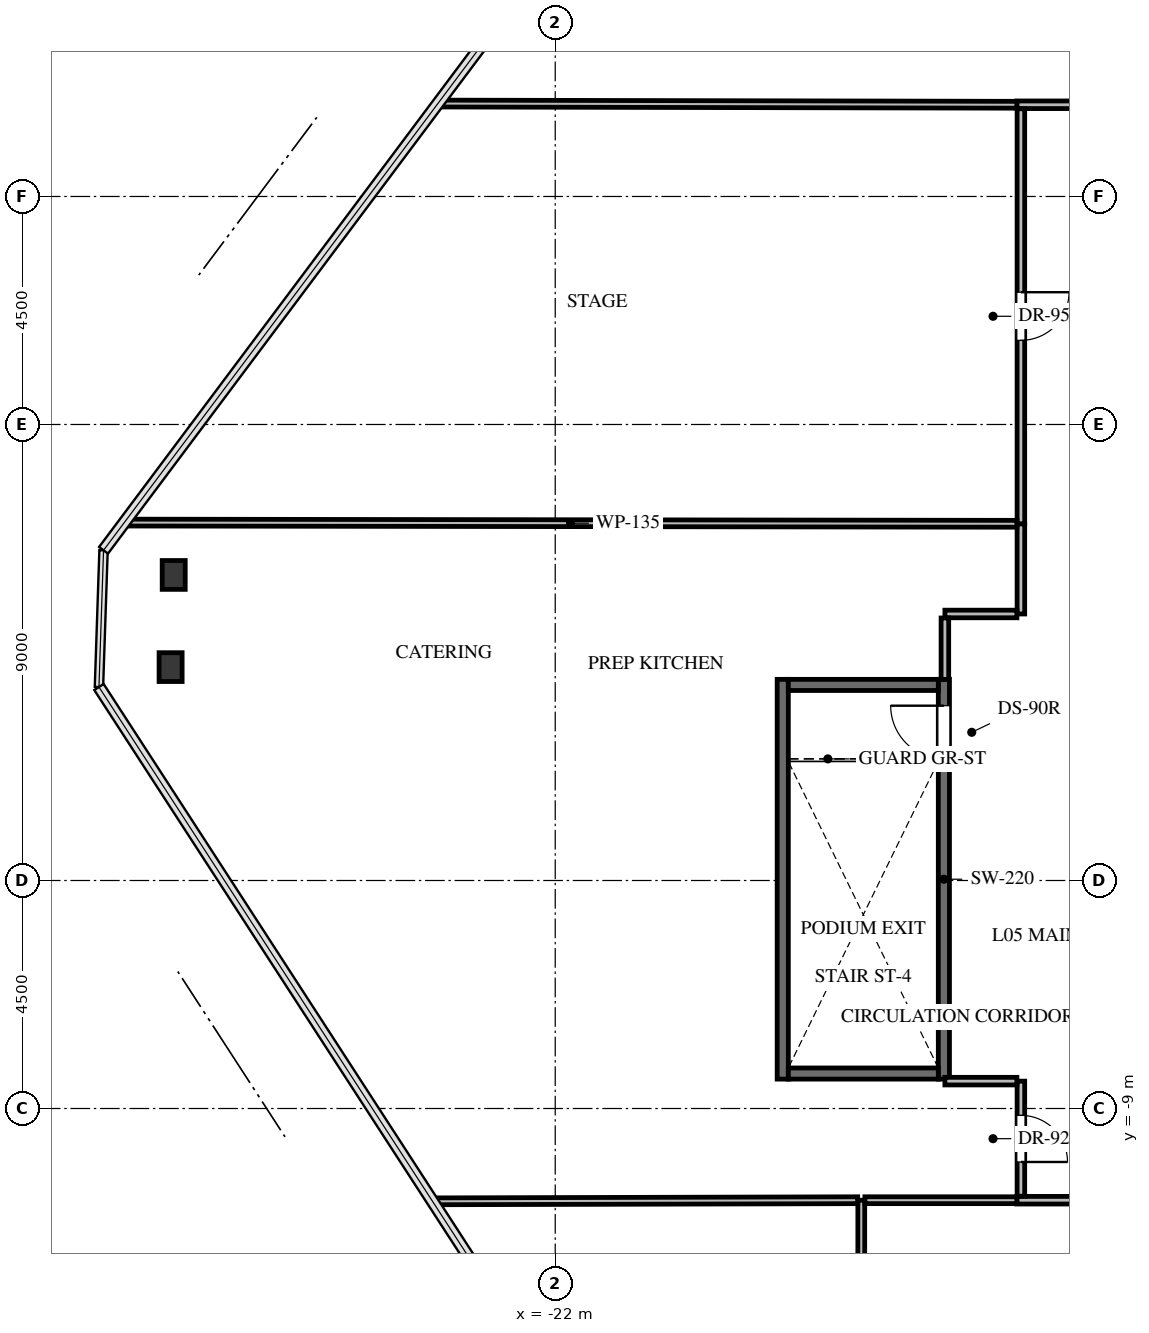
"""IFC4 building model, lengths in metres.
Left out: names, types, materials, properties, quantities, classifications, styles, units other than length and angle.
Written with IfcOpenShell. Run it as: python <this file> out.ifc"""

import sys

from ifc_helpers import new_model, si_unit, direction, frame, frame_2d, origin, origin_2d, place, context, subcontext, project, spatial, rectangle, i_section, extrude, source, transform, mapped, element, fill, save


model = new_model("IFC4")
c1 = context("Model", 3, precision=1e-05, world=origin(), true_north=direction((0.0, 1.0)))
c2 = subcontext(c1, "Body", "Model", "MODEL_VIEW")
j1 = project(units=[si_unit("LENGTHUNIT", "METRE"), si_unit("PLANEANGLEUNIT", "RADIAN")], contexts=[c1])
p1 = place(None, origin())
s1 = spatial("IfcSite", under=j1, at=p1, CompositionType="ELEMENT")
p2 = place(p1, origin())
s2 = spatial("IfcBuilding", under=s1, at=p2, CompositionType="ELEMENT")
p3 = place(p2, frame((0.0, 0.0, 26.8)))
s3 = spatial("IfcBuildingStorey", under=s2, at=p3, CompositionType="ELEMENT", Elevation=26.8)
p4 = place(p3, frame((-14.33, -8.42, -0.32), z_axis=(0.0, 0.0, 1.0), x_axis=(0.0, 1.0, 0.0)))
e1 = element("IfcWall", 1, at=p4, inside=s3, PredefinedType="SHEAR", context=c2, shape_type="SweptSolid", body=[
    extrude(rectangle(XDim=7.89, YDim=0.22, at=frame_2d((3.945, 0.0))), origin(), (0.0, 0.0, 1.0), 5.68),
])
p5 = place(p4, frame((6.32, 0.0, 0.0)))
e2 = element("IfcOpeningElement", 2, at=p5, cuts=e1, PredefinedType="OPENING", context=c2, shape_type="SweptSolid", body=[
    extrude(rectangle(XDim=1.05, YDim=2.15, at=frame_2d((0.525, 1.075))), frame((0.0, 0.12, 0.0), z_axis=(0.0, -1.0, 0.0), x_axis=(1.0, 0.0, 0.0)), (0.0, 0.0, 1.0), 0.24),
])
p6 = place(p3, frame((-17.51, -0.53, -0.32), z_axis=(0.0, 0.0, 1.0), x_axis=(0.0, -1.0, 0.0)))
e3 = element("IfcWall", 3, at=p6, inside=s3, PredefinedType="SHEAR", context=c2, shape_type="SweptSolid", body=[
    extrude(rectangle(XDim=7.89, YDim=0.22, at=frame_2d((3.945, 0.0))), origin(), (0.0, 0.0, 1.0), 5.68),
])
for number, where, z_axis, x_axis in (
    (4, (-17.4, -8.31, -0.32), (0.0, 0.0, 1.0), (1.0, 0.0, 0.0)),
    (5, (-14.44, -0.64, -0.32), (0.0, 0.0, 1.0), (-1.0, 0.0, 0.0)),
):
    element("IfcWall", number, at=place(p3, frame(where, z_axis=z_axis, x_axis=x_axis)), inside=s3, PredefinedType="SHEAR", context=c2, shape_type="SweptSolid", body=[
        extrude(rectangle(XDim=2.96, YDim=0.22, at=frame_2d((1.48, 0.0))), origin(), (0.0, 0.0, 1.0), 5.68),
    ])
m1 = source(origin(), c2, "Body", "SweptSolid", [
    extrude(i_section(OverallWidth=0.454, OverallDepth=0.569, WebThickness=0.078, FlangeThickness=0.125, FilletRadius=0.031, at=origin_2d()), origin(), (0.0, 0.0, 1.0), 5.68),
])
for number, where, z_axis, x_axis in (
    (6, (-29.591, -0.289, -0.32), (0.0, 0.0, 1.0), (1.0, 0.0, 0.0)),
    (7, (-29.529, 1.531, -0.32), (0.0, 0.0, 1.0), (1.0, 0.0, 0.0)),
):
    element("IfcColumn", number, at=place(p3, frame(where, z_axis=z_axis, x_axis=x_axis)), inside=s3, PredefinedType="COLUMN", context=c2, shape_type="MappedRepresentation", body=[
        mapped(m1, transform((0.0, 0.0, 0.0), x_axis=(1.0, 0.0, 0.0), y_axis=(0.0, 1.0, 0.0), z_axis=(0.0, 0.0, 1.0), scale=1.0)),
    ])
p7 = place(p3, frame((-8.96, 10.81, 0.0), z_axis=(0.0, 0.0, 1.0), x_axis=(-1.0, 0.0, 0.0)))
e8 = element("IfcWall", 8, at=p7, inside=s3, PredefinedType="PARTITIONING", context=c2, shape_type="SweptSolid", body=[
    extrude(rectangle(XDim=3.93, YDim=0.15, at=frame_2d((1.965, 0.0))), origin(), (0.0, 0.0, 1.0), 3.53),
])
p8 = place(p7, frame((1.49, 0.0, 0.0)))
e9 = element("IfcOpeningElement", 9, at=p8, cuts=e8, PredefinedType="OPENING", context=c2, shape_type="SweptSolid", body=[
    extrude(rectangle(XDim=0.95, YDim=2.1, at=frame_2d((0.475, 1.05))), frame((0.0, 0.085, 0.0), z_axis=(0.0, -1.0, 0.0), x_axis=(1.0, 0.0, 0.0)), (0.0, 0.0, 1.0), 0.17),
])
p9 = place(p3, frame((-12.89, -10.81, 0.0), z_axis=(0.0, 0.0, 1.0), x_axis=(1.0, 0.0, 0.0)))
e10 = element("IfcWall", 10, at=p9, inside=s3, PredefinedType="PARTITIONING", context=c2, shape_type="SweptSolid", body=[
    extrude(rectangle(XDim=6.93, YDim=0.15, at=frame_2d((3.465, 0.0))), origin(), (0.0, 0.0, 1.0), 3.53),
])
p10 = place(p9, frame((3.005, 0.0, 0.0)))
e11 = element("IfcOpeningElement", 11, at=p10, cuts=e10, PredefinedType="OPENING", context=c2, shape_type="SweptSolid", body=[
    extrude(rectangle(XDim=0.92, YDim=2.1, at=frame_2d((0.46, 1.05))), frame((0.0, 0.085, 0.0), z_axis=(0.0, -1.0, 0.0), x_axis=(1.0, 0.0, 0.0)), (0.0, 0.0, 1.0), 0.17),
])
p11 = place(p3, frame((-12.81, -8.46, 0.0), z_axis=(0.0, 0.0, 1.0), x_axis=(0.0, -1.0, 0.0)))
e12 = element("IfcWall", 12, at=p11, inside=s3, PredefinedType="PARTITIONING", context=c2, shape_type="SweptSolid", body=[
    extrude(rectangle(XDim=2.271, YDim=0.15, at=frame_2d((1.135, 0.0))), origin(), (0.0, 0.0, 1.0), 5.345),
])
p12 = place(p11, frame((0.676, 0.0, 0.0)))
e13 = element("IfcOpeningElement", 13, at=p12, cuts=e12, PredefinedType="OPENING", context=c2, shape_type="SweptSolid", body=[
    extrude(rectangle(XDim=0.92, YDim=2.1, at=frame_2d((0.46, 1.05))), frame((0.0, 0.085, 0.0), z_axis=(0.0, -1.0, 0.0), x_axis=(1.0, 0.0, 0.0)), (0.0, 0.0, 1.0), 0.17),
])
p13 = place(p3, frame((-12.81, 2.54, 0.0), z_axis=(0.0, 0.0, 1.0), x_axis=(0.0, -1.0, 0.0)))
e14 = element("IfcWall", 14, at=p13, inside=s3, PredefinedType="PARTITIONING", context=c2, shape_type="SweptSolid", body=[
    extrude(rectangle(XDim=1.78, YDim=0.15, at=frame_2d((0.89, 0.0))), origin(), (0.0, 0.0, 1.0), 3.53),
])
for number, where, z_axis, x_axis in (
    (15, (-12.889, 0.76, 0.0), (0.0, 0.0, 1.0), (-1.0, 0.0, 0.0)),
    (16, (-14.31, -8.46, 0.0), (0.0, 0.0, 1.0), (1.0, 0.0, 0.0)),
):
    element("IfcWall", number, at=place(p3, frame(where, z_axis=z_axis, x_axis=x_axis)), inside=s3, PredefinedType="PARTITIONING", context=c2, shape_type="SweptSolid", body=[
        extrude(rectangle(XDim=1.421, YDim=0.15, at=frame_2d((0.71, 0.0))), origin(), (0.0, 0.0, 1.0), 5.345),
    ])
p14 = place(p3, frame((-14.31, 0.681, 0.0), z_axis=(0.0, 0.0, 1.0), x_axis=(0.0, -1.0, 0.0)))
e17 = element("IfcWall", 17, at=p14, inside=s3, PredefinedType="PARTITIONING", context=c2, shape_type="SweptSolid", body=[
    extrude(rectangle(XDim=1.211, YDim=0.15, at=frame_2d((0.605, 0.0))), origin(), (0.0, 0.0, 1.0), 5.345),
])
p15 = place(p3, frame((-12.81, 10.731, 0.0), z_axis=(0.0, 0.0, 1.0), x_axis=(0.0, -1.0, 0.0)))
e18 = element("IfcWall", 18, at=p15, inside=s3, PredefinedType="PARTITIONING", context=c2, shape_type="SweptSolid", body=[
    extrude(rectangle(XDim=8.191, YDim=0.15, at=frame_2d((4.095, 0.0))), origin(), (0.0, 0.0, 1.0), 3.53),
])
p16 = place(p15, frame((3.621, 0.0, 0.0)))
e19 = element("IfcOpeningElement", 19, at=p16, cuts=e18, PredefinedType="OPENING", context=c2, shape_type="SweptSolid", body=[
    extrude(rectangle(XDim=0.95, YDim=2.1, at=frame_2d((0.475, 1.05))), frame((0.0, 0.085, 0.0), z_axis=(0.0, -1.0, 0.0), x_axis=(1.0, 0.0, 0.0)), (0.0, 0.0, 1.0), 0.17),
])
p17 = place(p3, frame((-12.89, 10.81, 0.0), z_axis=(0.0, 0.0, 1.0), x_axis=(-0.999997852069, 0.002072645121, 0.0)))
e20 = element("IfcWall", 20, at=p17, inside=s3, PredefinedType="PARTITIONING", context=c2, shape_type="SweptSolid", body=[
    extrude(rectangle(XDim=11.426, YDim=0.135, at=frame_2d((5.713, 0.0))), origin(), (0.0, 0.0, 1.0), 3.53),
])
p18 = place(p3, frame((-15.96, -10.81, 0.0), z_axis=(0.0, 0.0, 1.0), x_axis=(0.0, -1.0, 0.0)))
e21 = element("IfcWall", 21, at=p18, inside=s3, PredefinedType="PARTITIONING", context=c2, shape_type="SweptSolid", body=[
    extrude(rectangle(XDim=6.015, YDim=0.135, at=frame_2d((3.007, 0.0))), origin(), (0.0, 0.0, 1.0), 5.345),
])
p19 = place(p18, frame((2.558, 0.0, 0.0)))
e22 = element("IfcOpeningElement", 22, at=p19, cuts=e21, PredefinedType="OPENING", context=c2, shape_type="SweptSolid", body=[
    extrude(rectangle(XDim=0.9, YDim=2.05, at=frame_2d((0.45, 1.025))), frame((0.0, 0.078, 0.0), z_axis=(0.0, -1.0, 0.0), x_axis=(1.0, 0.0, 0.0)), (0.0, 0.0, 1.0), 0.155),
])
p20 = place(p3, frame((-24.422, -10.832, 0.0), z_axis=(0.0, 0.0, 1.0), x_axis=(0.9999967215, 0.002560662035, 0.0)))
e23 = element("IfcWall", 23, at=p20, inside=s3, PredefinedType="PARTITIONING", context=c2, shape_type="SweptSolid", body=[
    extrude(rectangle(XDim=8.39, YDim=0.135, at=frame_2d((4.195, 0.0))), origin(), (0.0, 0.0, 1.0), 3.53),
])
p21 = place(p3, frame((-15.888, -10.81, 0.0), z_axis=(0.0, 0.0, 1.0), x_axis=(1.0, 0.0, 0.0)))
e24 = element("IfcWall", 24, at=p21, inside=s3, PredefinedType="PARTITIONING", context=c2, shape_type="SweptSolid", body=[
    extrude(rectangle(XDim=2.999, YDim=0.135, at=frame_2d((1.499, 0.0))), origin(), (0.0, 0.0, 1.0), 5.345),
])
p22 = place(p3, frame((-30.505, 2.564, 0.0), z_axis=(0.0, 0.0, 1.0), x_axis=(0.999999077639, -0.001358204807, 0.0)))
e25 = element("IfcWall", 25, at=p22, inside=s3, PredefinedType="PARTITIONING", context=c2, shape_type="SweptSolid", body=[
    extrude(rectangle(XDim=17.616, YDim=0.135, at=frame_2d((8.808, 0.0))), origin(), (0.0, 0.0, 1.0), 3.53),
])
m2 = source(origin(), c2, "Body", "SweptSolid", [
    extrude(rectangle(XDim=1.05, YDim=2.15, at=frame_2d((0.525, 1.075))), frame((0.0, 0.025, 0.0), z_axis=(0.0, -1.0, 0.0), x_axis=(1.0, 0.0, 0.0)), (0.0, 0.0, 1.0), 0.05),
])
p23 = place(p5, origin())
e26 = element("IfcDoor", 26, at=p23, inside=s3, OperationType="SINGLE_SWING_RIGHT", PredefinedType="DOOR", context=c2, shape_type="MappedRepresentation", body=[
    mapped(m2, transform((0.0, 0.0, 0.0), x_axis=(1.0, 0.0, 0.0), y_axis=(0.0, 1.0, 0.0), z_axis=(0.0, 0.0, 1.0), scale=1.0)),
])
fill(e2, e26)
m3 = source(origin(), c2, "Body", "SweptSolid", [
    extrude(rectangle(XDim=0.92, YDim=2.1, at=frame_2d((0.46, 1.05))), frame((0.0, 0.025, 0.0), z_axis=(0.0, -1.0, 0.0), x_axis=(1.0, 0.0, 0.0)), (0.0, 0.0, 1.0), 0.05),
])
p24 = place(p12, origin())
e27 = element("IfcDoor", 27, at=p24, inside=s3, OperationType="SINGLE_SWING_RIGHT", PredefinedType="DOOR", context=c2, shape_type="MappedRepresentation", body=[
    mapped(m3, transform((0.0, 0.0, 0.0), x_axis=(1.0, 0.0, 0.0), y_axis=(0.0, 1.0, 0.0), z_axis=(0.0, 0.0, 1.0), scale=1.0)),
])
fill(e13, e27)
m4 = source(origin(), c2, "Body", "SweptSolid", [
    extrude(rectangle(XDim=0.95, YDim=2.1, at=frame_2d((0.475, 1.05))), frame((0.0, 0.025, 0.0), z_axis=(0.0, -1.0, 0.0), x_axis=(1.0, 0.0, 0.0)), (0.0, 0.0, 1.0), 0.05),
])
p25 = place(p16, origin())
e28 = element("IfcDoor", 28, at=p25, inside=s3, OperationType="SINGLE_SWING_LEFT", PredefinedType="DOOR", context=c2, shape_type="MappedRepresentation", body=[
    mapped(m4, transform((0.0, 0.0, 0.0), x_axis=(1.0, 0.0, 0.0), y_axis=(0.0, 1.0, 0.0), z_axis=(0.0, 0.0, 1.0), scale=1.0)),
])
fill(e19, e28)
save(model, sys.argv[1])
